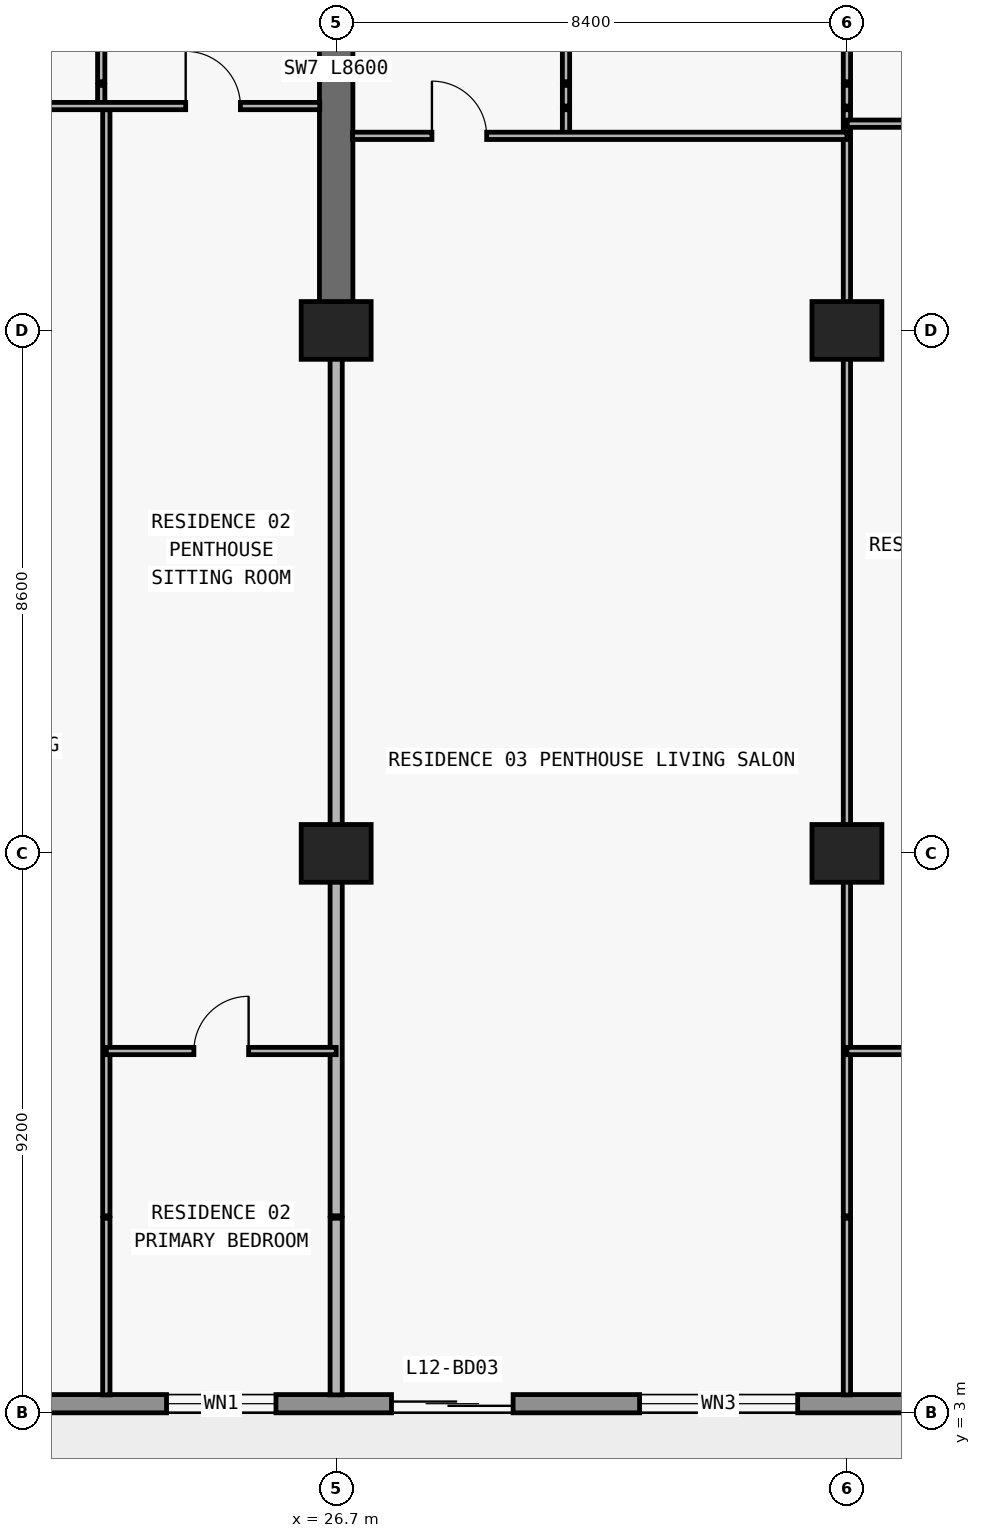
"""IFC4 building model, lengths in metres.
Left out: names, types, materials, properties, quantities, classifications, styles, units other than length and angle.
Written with IfcOpenShell. Run it as: python <this file> out.ifc"""

import sys

from ifc_helpers import new_model, si_unit, direction, frame, frame_2d, origin, origin_2d, place, context, subcontext, project, spatial, rectangle, extrude, element, fill, save


model = new_model("IFC4")
c1 = context("Model", 3, precision=1e-05, world=origin(), true_north=direction((0.0, 1.0)))
c2 = subcontext(c1, "Body", "Model", "MODEL_VIEW")
j1 = project(units=[si_unit("LENGTHUNIT", "METRE"), si_unit("PLANEANGLEUNIT", "RADIAN")], contexts=[c1])
p1 = place(None, origin())
s1 = spatial("IfcSite", under=j1, at=p1, CompositionType="ELEMENT")
p2 = place(p1, origin())
s2 = spatial("IfcBuilding", under=s1, at=p2, CompositionType="ELEMENT")
p3 = place(p2, frame((0.0, 0.0, 49.8)))
s3 = spatial("IfcBuildingStorey", under=s2, at=p3, CompositionType="ELEMENT", Elevation=49.8)
for number, where, z_axis, x_axis in (
    (1, (26.7, 12.2, 0.0), (0.0, 0.0, 1.0), (1.0, 0.0, 0.0)),
    (2, (35.1, 12.2, 0.0), (0.0, 0.0, 1.0), (1.0, 0.0, 0.0)),
    (3, (26.7, 20.8, 0.0), (0.0, 0.0, 1.0), (1.0, 0.0, 0.0)),
    (4, (35.1, 20.8, 0.0), (0.0, 0.0, 1.0), (1.0, 0.0, 0.0)),
):
    element("IfcColumn", number, at=place(p3, frame(where, z_axis=z_axis, x_axis=x_axis)), inside=s3, PredefinedType="COLUMN", context=c2, shape_type="SweptSolid", body=[
        extrude(rectangle(XDim=1.15, YDim=0.95, at=origin_2d()), origin(), (0.0, 0.0, 1.0), 3.05),
    ])
p4 = place(p3, frame((26.7, 20.8, 0.0), z_axis=(0.0, 0.0, 1.0), x_axis=(0.0, 1.0, 0.0)))
e5 = element("IfcWall", 5, at=p4, inside=s3, PredefinedType="SHEAR", context=c2, shape_type="SweptSolid", body=[
    extrude(rectangle(XDim=8.6, YDim=0.55, at=frame_2d((4.3, 0.0))), origin(), (0.0, 0.0, 1.0), 3.05),
])
p5 = place(p3, frame((72.7, 3.15, 0.0), z_axis=(0.0, 0.0, 1.0), x_axis=(-1.0, 0.0, 0.0)))
e6 = element("IfcWall", 6, at=p5, inside=s3, PredefinedType="STANDARD", context=c2, shape_type="SweptSolid", body=[
    extrude(rectangle(XDim=67.6, YDim=0.3, at=frame_2d((33.8, 0.0))), origin(), (0.0, 0.0, 1.0), 3.05),
])
p6 = place(p5, frame((59.826, 0.0, 0.0)))
e7 = element("IfcOpeningElement", 7, at=p6, cuts=e6, PredefinedType="OPENING", context=c2, shape_type="SweptSolid", body=[
    extrude(rectangle(XDim=2.0, YDim=2.3, at=frame_2d((1.0, 1.15))), frame((0.0, 0.16, 0.0), z_axis=(0.0, -1.0, 0.0), x_axis=(1.0, 0.0, 0.0)), (0.0, 0.0, 1.0), 0.32),
])
p7 = place(p5, frame((55.526, 0.0, 0.85)))
e8 = element("IfcOpeningElement", 8, at=p7, cuts=e6, PredefinedType="OPENING", context=c2, shape_type="SweptSolid", body=[
    extrude(rectangle(XDim=2.2, YDim=1.55, at=frame_2d((1.1, 0.775))), frame((0.0, 0.16, 0.0), z_axis=(0.0, -1.0, 0.0), x_axis=(1.0, 0.0, 0.0)), (0.0, 0.0, 1.0), 0.32),
])
p8 = place(p5, frame((51.09, 0.0, 0.0)))
e9 = element("IfcOpeningElement", 9, at=p8, cuts=e6, PredefinedType="OPENING", context=c2, shape_type="SweptSolid", body=[
    extrude(rectangle(XDim=2.0, YDim=2.3, at=frame_2d((1.0, 1.15))), frame((0.0, 0.16, 0.0), z_axis=(0.0, -1.0, 0.0), x_axis=(1.0, 0.0, 0.0)), (0.0, 0.0, 1.0), 0.32),
])
p9 = place(p5, frame((46.99, 0.0, 0.85)))
e10 = element("IfcOpeningElement", 10, at=p9, cuts=e6, PredefinedType="OPENING", context=c2, shape_type="SweptSolid", body=[
    extrude(rectangle(XDim=1.8, YDim=1.55, at=frame_2d((0.9, 0.775))), frame((0.0, 0.16, 0.0), z_axis=(0.0, -1.0, 0.0), x_axis=(1.0, 0.0, 0.0)), (0.0, 0.0, 1.0), 0.32),
])
p10 = place(p5, frame((43.09, 0.0, 0.0)))
e11 = element("IfcOpeningElement", 11, at=p10, cuts=e6, PredefinedType="OPENING", context=c2, shape_type="SweptSolid", body=[
    extrude(rectangle(XDim=2.0, YDim=2.3, at=frame_2d((1.0, 1.15))), frame((0.0, 0.16, 0.0), z_axis=(0.0, -1.0, 0.0), x_axis=(1.0, 0.0, 0.0)), (0.0, 0.0, 1.0), 0.32),
])
p11 = place(p5, frame((38.41, 0.0, 0.65)))
e12 = element("IfcOpeningElement", 12, at=p11, cuts=e6, PredefinedType="OPENING", context=c2, shape_type="SweptSolid", body=[
    extrude(rectangle(XDim=2.6, YDim=1.85, at=frame_2d((1.3, 0.925))), frame((0.0, 0.16, 0.0), z_axis=(0.0, -1.0, 0.0), x_axis=(1.0, 0.0, 0.0)), (0.0, 0.0, 1.0), 0.32),
])
p12 = place(p5, frame((32.7, 0.0, 0.85)))
e13 = element("IfcOpeningElement", 13, at=p12, cuts=e6, PredefinedType="OPENING", context=c2, shape_type="SweptSolid", body=[
    extrude(rectangle(XDim=2.2, YDim=1.55, at=frame_2d((1.1, 0.775))), frame((0.0, 0.16, 0.0), z_axis=(0.0, -1.0, 0.0), x_axis=(1.0, 0.0, 0.0)), (0.0, 0.0, 1.0), 0.32),
])
p13 = place(p5, frame((24.7, 0.0, 0.85)))
e14 = element("IfcOpeningElement", 14, at=p13, cuts=e6, PredefinedType="OPENING", context=c2, shape_type="SweptSolid", body=[
    extrude(rectangle(XDim=2.2, YDim=1.55, at=frame_2d((1.1, 0.775))), frame((0.0, 0.16, 0.0), z_axis=(0.0, -1.0, 0.0), x_axis=(1.0, 0.0, 0.0)), (0.0, 0.0, 1.0), 0.32),
])
p14 = place(p5, frame((18.29, 0.0, 0.0)))
e15 = element("IfcOpeningElement", 15, at=p14, cuts=e6, PredefinedType="OPENING", context=c2, shape_type="SweptSolid", body=[
    extrude(rectangle(XDim=2.0, YDim=2.3, at=frame_2d((1.0, 1.15))), frame((0.0, 0.16, 0.0), z_axis=(0.0, -1.0, 0.0), x_axis=(1.0, 0.0, 0.0)), (0.0, 0.0, 1.0), 0.32),
])
p15 = place(p5, frame((14.19, 0.0, 0.85)))
e16 = element("IfcOpeningElement", 16, at=p15, cuts=e6, PredefinedType="OPENING", context=c2, shape_type="SweptSolid", body=[
    extrude(rectangle(XDim=1.8, YDim=1.55, at=frame_2d((0.9, 0.775))), frame((0.0, 0.16, 0.0), z_axis=(0.0, -1.0, 0.0), x_axis=(1.0, 0.0, 0.0)), (0.0, 0.0, 1.0), 0.32),
])
p16 = place(p5, frame((10.226, 0.0, 0.0)))
e17 = element("IfcOpeningElement", 17, at=p16, cuts=e6, PredefinedType="OPENING", context=c2, shape_type="SweptSolid", body=[
    extrude(rectangle(XDim=2.0, YDim=2.3, at=frame_2d((1.0, 1.15))), frame((0.0, 0.16, 0.0), z_axis=(0.0, -1.0, 0.0), x_axis=(1.0, 0.0, 0.0)), (0.0, 0.0, 1.0), 0.32),
])
p17 = place(p5, frame((5.926, 0.0, 0.85)))
e18 = element("IfcOpeningElement", 18, at=p17, cuts=e6, PredefinedType="OPENING", context=c2, shape_type="SweptSolid", body=[
    extrude(rectangle(XDim=2.2, YDim=1.55, at=frame_2d((1.1, 0.775))), frame((0.0, 0.16, 0.0), z_axis=(0.0, -1.0, 0.0), x_axis=(1.0, 0.0, 0.0)), (0.0, 0.0, 1.0), 0.32),
])
p18 = place(p3, frame((22.836, 24.49, 0.0), z_axis=(0.0, 0.0, 1.0), x_axis=(0.0, 1.0, 0.0)))
e19 = element("IfcWall", 19, at=p18, inside=s3, PredefinedType="PARTITIONING", context=c2, shape_type="SweptSolid", body=[
    extrude(rectangle(XDim=0.34, YDim=0.12, at=frame_2d((0.17, 0.0))), origin(), (0.0, 0.0, 1.0), 3.05),
])
p19 = place(p3, frame((22.836, 24.89, 0.0), z_axis=(0.0, 0.0, 1.0), x_axis=(0.0, 1.0, 0.0)))
e20 = element("IfcWall", 20, at=p19, inside=s3, PredefinedType="PARTITIONING", context=c2, shape_type="SweptSolid", body=[
    extrude(rectangle(XDim=4.69, YDim=0.12, at=frame_2d((2.345, 0.0))), origin(), (0.0, 0.0, 1.0), 3.05),
])
p20 = place(p19, frame((1.895, 0.0, 0.0)))
e21 = element("IfcOpeningElement", 21, at=p20, cuts=e20, PredefinedType="OPENING", context=c2, shape_type="SweptSolid", body=[
    extrude(rectangle(XDim=0.9, YDim=2.15, at=frame_2d((0.45, 1.075))), frame((0.0, 0.07, 0.0), z_axis=(0.0, -1.0, 0.0), x_axis=(1.0, 0.0, 0.0)), (0.0, 0.0, 1.0), 0.14),
])
p21 = place(p3, frame((22.92, 3.295, 0.0), z_axis=(0.0, 0.0, 1.0), x_axis=(0.0, 1.0, 0.0)))
e22 = element("IfcWall", 22, at=p21, inside=s3, PredefinedType="PARTITIONING", context=c2, shape_type="SweptSolid", body=[
    extrude(rectangle(XDim=2.905, YDim=0.12, at=frame_2d((1.453, 0.0))), origin(), (0.0, 0.0, 1.0), 3.05),
])
p22 = place(p3, frame((22.92, 6.24, 0.0), z_axis=(0.0, 0.0, 1.0), x_axis=(0.0, 1.0, 0.0)))
e23 = element("IfcWall", 23, at=p22, inside=s3, PredefinedType="PARTITIONING", context=c2, shape_type="SweptSolid", body=[
    extrude(rectangle(XDim=18.19, YDim=0.12, at=frame_2d((9.095, 0.0))), origin(), (0.0, 0.0, 1.0), 3.05),
])
p23 = place(p3, frame((26.7, 3.295, 0.0), z_axis=(0.0, 0.0, 1.0), x_axis=(0.0, 1.0, 0.0)))
e24 = element("IfcWall", 24, at=p23, inside=s3, PredefinedType="PARTITIONING", context=c2, shape_type="SweptSolid", body=[
    extrude(rectangle(XDim=2.905, YDim=0.2, at=frame_2d((1.453, 0.0))), origin(), (0.0, 0.0, 1.0), 3.05),
])
p24 = place(p3, frame((26.7, 6.24, 0.0), z_axis=(0.0, 0.0, 1.0), x_axis=(0.0, 1.0, 0.0)))
e25 = element("IfcWall", 25, at=p24, inside=s3, PredefinedType="PARTITIONING", context=c2, shape_type="SweptSolid", body=[
    extrude(rectangle(XDim=14.555, YDim=0.2, at=frame_2d((7.277, 0.0))), origin(), (0.0, 0.0, 1.0), 2.11),
])
p25 = place(p3, frame((30.48, 24.0, 0.0), z_axis=(0.0, 0.0, 1.0), x_axis=(0.0, 1.0, 0.0)))
e26 = element("IfcWall", 26, at=p25, inside=s3, PredefinedType="PARTITIONING", context=c2, shape_type="SweptSolid", body=[
    extrude(rectangle(XDim=0.43, YDim=0.12, at=frame_2d((0.215, 0.0))), origin(), (0.0, 0.0, 1.0), 3.05),
])
p26 = place(p3, frame((30.48, 24.49, 0.0), z_axis=(0.0, 0.0, 1.0), x_axis=(0.0, 1.0, 0.0)))
e27 = element("IfcWall", 27, at=p26, inside=s3, PredefinedType="PARTITIONING", context=c2, shape_type="SweptSolid", body=[
    extrude(rectangle(XDim=0.34, YDim=0.12, at=frame_2d((0.17, 0.0))), origin(), (0.0, 0.0, 1.0), 3.05),
])
p27 = place(p3, frame((30.48, 24.89, 0.0), z_axis=(0.0, 0.0, 1.0), x_axis=(0.0, 1.0, 0.0)))
e28 = element("IfcWall", 28, at=p27, inside=s3, PredefinedType="PARTITIONING", context=c2, shape_type="SweptSolid", body=[
    extrude(rectangle(XDim=3.91, YDim=0.12, at=frame_2d((1.955, 0.0))), origin(), (0.0, 0.0, 1.0), 3.05),
])
p28 = place(p27, frame((1.505, 0.0, 0.0)))
e29 = element("IfcOpeningElement", 29, at=p28, cuts=e28, PredefinedType="OPENING", context=c2, shape_type="SweptSolid", body=[
    extrude(rectangle(XDim=0.9, YDim=2.15, at=frame_2d((0.45, 1.075))), frame((0.0, 0.07, 0.0), z_axis=(0.0, -1.0, 0.0), x_axis=(1.0, 0.0, 0.0)), (0.0, 0.0, 1.0), 0.14),
])
p29 = place(p3, frame((35.1, 3.295, 0.0), z_axis=(0.0, 0.0, 1.0), x_axis=(0.0, 1.0, 0.0)))
e30 = element("IfcWall", 30, at=p29, inside=s3, PredefinedType="PARTITIONING", context=c2, shape_type="SweptSolid", body=[
    extrude(rectangle(XDim=2.905, YDim=0.12, at=frame_2d((1.453, 0.0))), origin(), (0.0, 0.0, 1.0), 3.05),
])
p30 = place(p3, frame((35.1, 6.24, 0.0), z_axis=(0.0, 0.0, 1.0), x_axis=(0.0, 1.0, 0.0)))
e31 = element("IfcWall", 31, at=p30, inside=s3, PredefinedType="PARTITIONING", context=c2, shape_type="SweptSolid", body=[
    extrude(rectangle(XDim=18.19, YDim=0.12, at=frame_2d((9.095, 0.0))), origin(), (0.0, 0.0, 1.0), 2.11),
])
p31 = place(p3, frame((35.1, 24.49, 0.0), z_axis=(0.0, 0.0, 1.0), x_axis=(0.0, 1.0, 0.0)))
e32 = element("IfcWall", 32, at=p31, inside=s3, PredefinedType="PARTITIONING", context=c2, shape_type="SweptSolid", body=[
    extrude(rectangle(XDim=0.34, YDim=0.12, at=frame_2d((0.17, 0.0))), origin(), (0.0, 0.0, 1.0), 2.11),
])
p32 = place(p3, frame((35.1, 24.89, 0.0), z_axis=(0.0, 0.0, 1.0), x_axis=(0.0, 1.0, 0.0)))
e33 = element("IfcWall", 33, at=p32, inside=s3, PredefinedType="PARTITIONING", context=c2, shape_type="SweptSolid", body=[
    extrude(rectangle(XDim=4.69, YDim=0.12, at=frame_2d((2.345, 0.0))), origin(), (0.0, 0.0, 1.0), 2.11),
])
p33 = place(p32, frame((1.405, 0.0, 0.0)))
e34 = element("IfcOpeningElement", 34, at=p33, cuts=e33, PredefinedType="OPENING", context=c2, shape_type="SweptSolid", body=[
    extrude(rectangle(XDim=0.9, YDim=2.06, at=frame_2d((0.45, 1.03))), frame((0.0, 0.07, 0.0), z_axis=(0.0, -1.0, 0.0), x_axis=(1.0, 0.0, 0.0)), (0.0, 0.0, 1.0), 0.14),
])
p34 = place(p3, frame((22.92, 8.95, 0.0), z_axis=(0.0, 0.0, 1.0), x_axis=(1.0, 0.0, 0.0)))
e35 = element("IfcWall", 35, at=p34, inside=s3, PredefinedType="PARTITIONING", context=c2, shape_type="SweptSolid", body=[
    extrude(rectangle(XDim=3.78, YDim=0.12, at=frame_2d((1.89, 0.0))), origin(), (0.0, 0.0, 1.0), 3.05),
])
p35 = place(p34, frame((1.44, 0.0, 0.0)))
e36 = element("IfcOpeningElement", 36, at=p35, cuts=e35, PredefinedType="OPENING", context=c2, shape_type="SweptSolid", body=[
    extrude(rectangle(XDim=0.9, YDim=2.15, at=frame_2d((0.45, 1.075))), frame((0.0, 0.07, 0.0), z_axis=(0.0, -1.0, 0.0), x_axis=(1.0, 0.0, 0.0)), (0.0, 0.0, 1.0), 0.14),
])
p36 = place(p3, frame((35.1, 8.95, 0.0), z_axis=(0.0, 0.0, 1.0), x_axis=(1.0, 0.0, 0.0)))
e37 = element("IfcWall", 37, at=p36, inside=s3, PredefinedType="PARTITIONING", context=c2, shape_type="SweptSolid", body=[
    extrude(rectangle(XDim=16.0, YDim=0.12, at=frame_2d((8.0, 0.0))), origin(), (0.0, 0.0, 1.0), 3.05),
])
p37 = place(p36, frame((3.35, 0.0, 0.0)))
e38 = element("IfcOpeningElement", 38, at=p37, cuts=e37, PredefinedType="OPENING", context=c2, shape_type="SweptSolid", body=[
    extrude(rectangle(XDim=0.9, YDim=2.15, at=frame_2d((0.45, 1.075))), frame((0.0, 0.07, 0.0), z_axis=(0.0, -1.0, 0.0), x_axis=(1.0, 0.0, 0.0)), (0.0, 0.0, 1.0), 0.14),
])
p38 = place(p36, frame((11.35, 0.0, 0.0)))
e39 = element("IfcOpeningElement", 39, at=p38, cuts=e37, PredefinedType="OPENING", context=c2, shape_type="SweptSolid", body=[
    extrude(rectangle(XDim=0.9, YDim=2.15, at=frame_2d((0.45, 1.075))), frame((0.0, 0.07, 0.0), z_axis=(0.0, -1.0, 0.0), x_axis=(1.0, 0.0, 0.0)), (0.0, 0.0, 1.0), 0.14),
])
p39 = place(p3, frame((26.97, 24.0, 0.0), z_axis=(0.0, 0.0, 1.0), x_axis=(1.0, 0.0, 0.0)))
e40 = element("IfcWall", 40, at=p39, inside=s3, PredefinedType="PARTITIONING", context=c2, shape_type="SweptSolid", body=[
    extrude(rectangle(XDim=8.13, YDim=0.12, at=frame_2d((4.065, 0.0))), origin(), (0.0, 0.0, 1.0), 3.05),
])
p40 = place(p39, frame((1.305, 0.0, 0.0)))
e41 = element("IfcOpeningElement", 41, at=p40, cuts=e40, PredefinedType="OPENING", context=c2, shape_type="SweptSolid", body=[
    extrude(rectangle(XDim=0.9, YDim=2.15, at=frame_2d((0.45, 1.075))), frame((0.0, 0.07, 0.0), z_axis=(0.0, -1.0, 0.0), x_axis=(1.0, 0.0, 0.0)), (0.0, 0.0, 1.0), 0.14),
])
p41 = place(p3, frame((35.105, 24.2, 0.0), z_axis=(0.0, 0.0, 1.0), x_axis=(1.0, 0.0, 0.0)))
e42 = element("IfcWall", 42, at=p41, inside=s3, PredefinedType="PARTITIONING", context=c2, shape_type="SweptSolid", body=[
    extrude(rectangle(XDim=7.59, YDim=0.12, at=frame_2d((3.795, 0.0))), origin(), (0.0, 0.0, 1.0), 3.05),
])
p42 = place(p41, frame((3.345, 0.0, 0.0)))
e43 = element("IfcOpeningElement", 43, at=p42, cuts=e42, PredefinedType="OPENING", context=c2, shape_type="SweptSolid", body=[
    extrude(rectangle(XDim=0.9, YDim=2.15, at=frame_2d((0.45, 1.075))), frame((0.0, 0.07, 0.0), z_axis=(0.0, -1.0, 0.0), x_axis=(1.0, 0.0, 0.0)), (0.0, 0.0, 1.0), 0.14),
])
p43 = place(p3, frame((18.3, 24.49, 0.0), z_axis=(0.0, 0.0, 1.0), x_axis=(1.0, 0.0, 0.0)))
e44 = element("IfcWall", 44, at=p43, inside=s3, PredefinedType="PARTITIONING", context=c2, shape_type="SweptSolid", body=[
    extrude(rectangle(XDim=8.13, YDim=0.12, at=frame_2d((4.065, 0.0))), origin(), (0.0, 0.0, 1.0), 3.05),
])
p44 = place(p43, frame((1.818, 0.0, 0.0)))
e45 = element("IfcOpeningElement", 45, at=p44, cuts=e44, PredefinedType="OPENING", context=c2, shape_type="SweptSolid", body=[
    extrude(rectangle(XDim=0.9, YDim=2.15, at=frame_2d((0.45, 1.075))), frame((0.0, 0.07, 0.0), z_axis=(0.0, -1.0, 0.0), x_axis=(1.0, 0.0, 0.0)), (0.0, 0.0, 1.0), 0.14),
])
p45 = place(p43, frame((5.925, 0.0, 0.0)))
e46 = element("IfcOpeningElement", 46, at=p45, cuts=e44, PredefinedType="OPENING", context=c2, shape_type="SweptSolid", body=[
    extrude(rectangle(XDim=0.9, YDim=2.15, at=frame_2d((0.45, 1.075))), frame((0.0, 0.07, 0.0), z_axis=(0.0, -1.0, 0.0), x_axis=(1.0, 0.0, 0.0)), (0.0, 0.0, 1.0), 0.14),
])
p46 = place(p9, origin())
e47 = element("IfcWindow", 47, at=p46, inside=s3, PartitioningType="SINGLE_PANEL", PredefinedType="WINDOW", context=c2, shape_type="SweptSolid", body=[
    extrude(rectangle(XDim=1.8, YDim=1.55, at=frame_2d((0.9, 0.775))), frame((0.0, 0.03, 0.0), z_axis=(0.0, -1.0, 0.0), x_axis=(1.0, 0.0, 0.0)), (0.0, 0.0, 1.0), 0.06),
])
fill(e10, e47)
p47 = place(p10, origin())
e48 = element("IfcDoor", 48, at=p47, inside=s3, OperationType="DOUBLE_DOOR_SLIDING", PredefinedType="DOOR", context=c2, shape_type="SweptSolid", body=[
    extrude(rectangle(XDim=2.0, YDim=2.3, at=frame_2d((1.0, 1.15))), frame((0.0, 0.025, 0.0), z_axis=(0.0, -1.0, 0.0), x_axis=(1.0, 0.0, 0.0)), (0.0, 0.0, 1.0), 0.05),
])
fill(e11, e48)
p48 = place(p11, origin())
e49 = element("IfcWindow", 49, at=p48, inside=s3, PartitioningType="SINGLE_PANEL", PredefinedType="WINDOW", context=c2, shape_type="SweptSolid", body=[
    extrude(rectangle(XDim=2.6, YDim=1.85, at=frame_2d((1.3, 0.925))), frame((0.0, 0.03, 0.0), z_axis=(0.0, -1.0, 0.0), x_axis=(1.0, 0.0, 0.0)), (0.0, 0.0, 1.0), 0.06),
])
fill(e12, e49)
p49 = place(p45, origin())
e50 = element("IfcDoor", 50, at=p49, inside=s3, OperationType="SINGLE_SWING_LEFT", PredefinedType="DOOR", context=c2, shape_type="SweptSolid", body=[
    extrude(rectangle(XDim=0.9, YDim=2.15, at=frame_2d((0.45, 1.075))), frame((0.0, 0.025, 0.0), z_axis=(0.0, -1.0, 0.0), x_axis=(1.0, 0.0, 0.0)), (0.0, 0.0, 1.0), 0.05),
])
fill(e46, e50)
p50 = place(p35, origin())
e51 = element("IfcDoor", 51, at=p50, inside=s3, OperationType="SINGLE_SWING_RIGHT", PredefinedType="DOOR", context=c2, shape_type="SweptSolid", body=[
    extrude(rectangle(XDim=0.9, YDim=2.15, at=frame_2d((0.45, 1.075))), frame((0.0, 0.025, 0.0), z_axis=(0.0, -1.0, 0.0), x_axis=(1.0, 0.0, 0.0)), (0.0, 0.0, 1.0), 0.05),
])
fill(e36, e51)
p51 = place(p40, origin())
e52 = element("IfcDoor", 52, at=p51, inside=s3, OperationType="SINGLE_SWING_LEFT", PredefinedType="DOOR", context=c2, shape_type="SweptSolid", body=[
    extrude(rectangle(XDim=0.9, YDim=2.15, at=frame_2d((0.45, 1.075))), frame((0.0, 0.025, 0.0), z_axis=(0.0, -1.0, 0.0), x_axis=(1.0, 0.0, 0.0)), (0.0, 0.0, 1.0), 0.05),
])
fill(e41, e52)
save(model, sys.argv[1])
